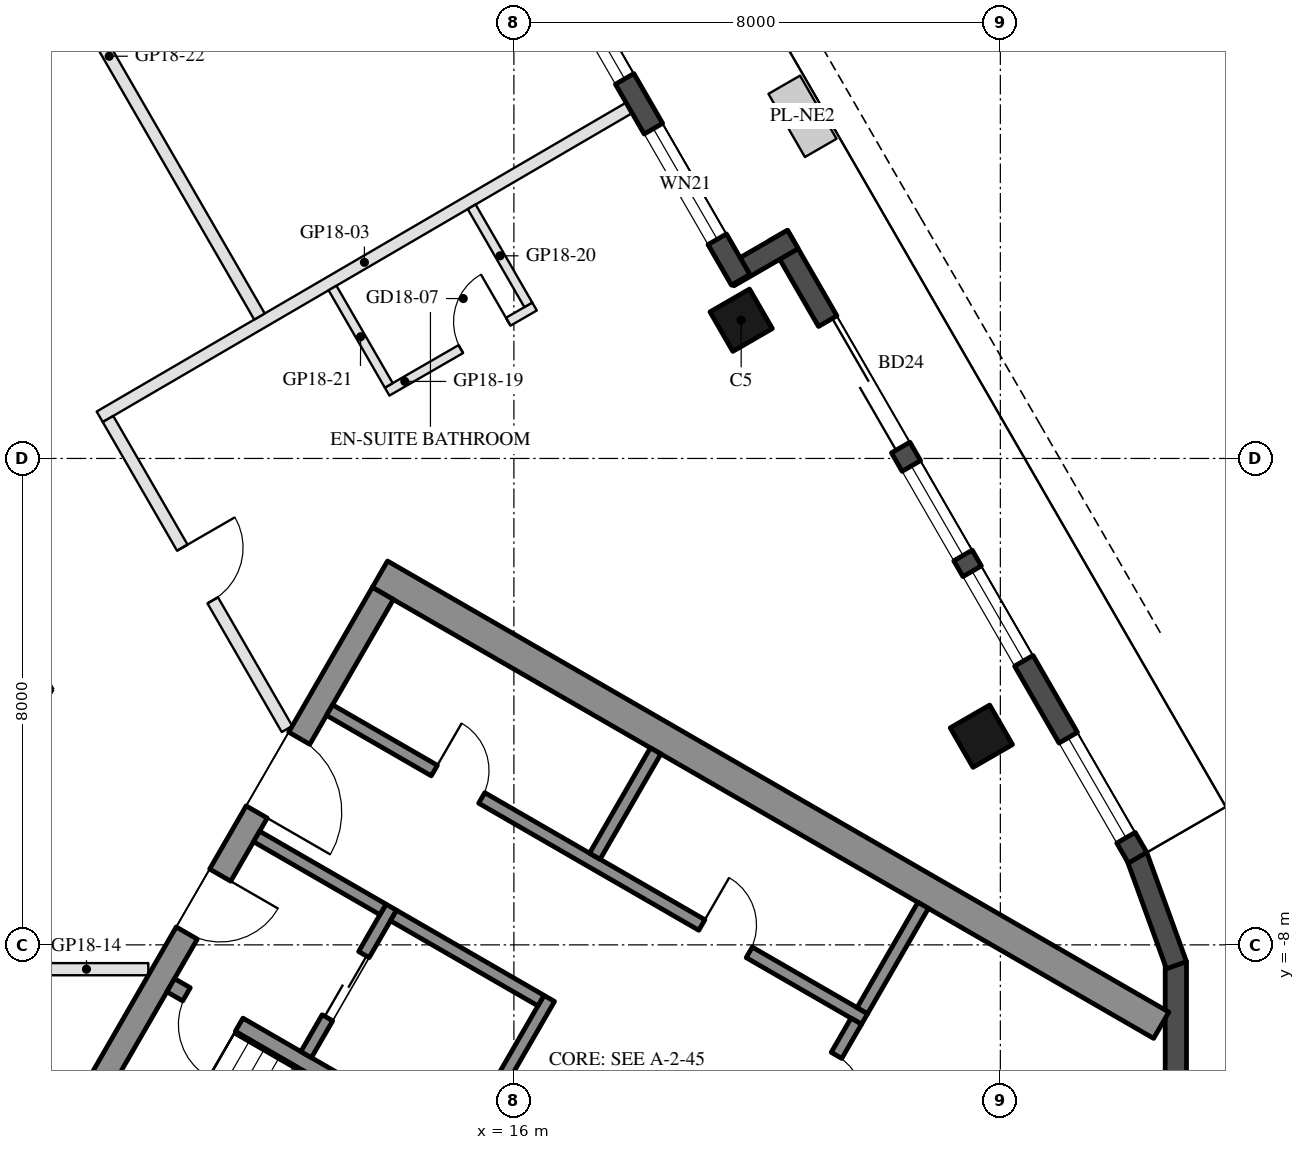
"""IFC4 building model, lengths in metres.
Left out: names, types, materials, properties, quantities, classifications, styles, units other than length and angle.
Written with IfcOpenShell. Run it as: python <this file> out.ifc"""

import sys

from ifc_helpers import new_model, si_unit, direction, frame, frame_2d, origin, origin_2d, place, context, subcontext, project, spatial, rectangle, hollow_rectangle, extrude, element, fill, save


model = new_model("IFC4")
c1 = context("Model", 3, precision=1e-05, world=origin(), true_north=direction((0.0, 1.0)))
c2 = subcontext(c1, "Body", "Model", "MODEL_VIEW")
j1 = project(units=[si_unit("LENGTHUNIT", "METRE"), si_unit("PLANEANGLEUNIT", "RADIAN")], contexts=[c1])
p1 = place(None, origin())
s1 = spatial("IfcSite", under=j1, at=p1, CompositionType="ELEMENT")
p2 = place(p1, origin())
s2 = spatial("IfcBuilding", under=s1, at=p2, CompositionType="ELEMENT")
p3 = place(p2, frame((0.0, 0.0, 194.7)))
s3 = spatial("IfcBuildingStorey", under=s2, at=p3, CompositionType="ELEMENT", Elevation=194.7)
for number, where, z_axis, x_axis in (
    (1, (23.688, -4.568, 0.0), (0.0, 0.0, 1.0), (-0.5, 0.866, 0.0)),
    (2, (19.738, 2.273, 0.0), (0.0, 0.0, 1.0), (-0.5, 0.866, 0.0)),
):
    element("IfcColumn", number, at=place(p3, frame(where, z_axis=z_axis, x_axis=x_axis)), inside=s3, PredefinedType="COLUMN", context=c2, shape_type="SweptSolid", body=[
        extrude(hollow_rectangle(XDim=0.75, YDim=0.75, WallThickness=0.035, at=origin_2d()), origin(), (0.0, 0.0, 1.0), 3.7),
    ])
for number, where, z_axis, x_axis in (
    (3, (26.244, -11.92, 0.0), (0.0, 0.0, 1.0), (0.342, 0.94, 0.0)),
    (4, (26.886, -10.185, 0.0), (0.0, 0.0, 1.0), (0.0, 1.0, 0.0)),
    (5, (26.897, -8.335, 0.0), (0.0, 0.0, 1.0), (-0.342, 0.94, 0.0)),
):
    element("IfcWall", number, at=place(p3, frame(where, z_axis=z_axis, x_axis=x_axis)), inside=s3, PredefinedType="SOLIDWALL", context=c2, shape_type="SweptSolid", body=[
        extrude(rectangle(XDim=1.91, YDim=0.35, at=frame_2d((0.955, 0.0))), origin(), (0.0, 0.0, 1.0), 3.55),
    ])
p4 = place(p3, frame((26.257, -6.567, 0.0), z_axis=(0.0, 0.0, 1.0), x_axis=(-0.500023526245, 0.866011820475, 0.0)))
e6 = element("IfcWall", 6, at=p4, inside=s3, PredefinedType="SOLIDWALL", context=c2, shape_type="SweptSolid", body=[
    extrude(rectangle(XDim=11.816, YDim=0.35, at=frame_2d((5.908, 0.0))), origin(), (0.0, 0.0, 1.0), 3.55),
])
p5 = place(p4, frame((0.38, 0.0, 0.3)))
e7 = element("IfcOpeningElement", 7, at=p5, cuts=e6, PredefinedType="OPENING", context=c2, shape_type="SweptSolid", body=[
    extrude(rectangle(XDim=1.9, YDim=2.65, at=frame_2d((0.95, 1.325))), frame((0.0, 0.185, 0.0), z_axis=(0.0, -1.0, 0.0), x_axis=(1.0, 0.0, 0.0)), (0.0, 0.0, 1.0), 0.37),
])
p6 = place(p4, frame((7.791, 0.0, 0.0)))
e8 = element("IfcOpeningElement", 8, at=p6, cuts=e6, PredefinedType="OPENING", context=c2, shape_type="SweptSolid", body=[
    extrude(rectangle(XDim=2.4, YDim=2.4, at=frame_2d((1.2, 1.2))), frame((0.0, 0.185, 0.0), z_axis=(0.0, -1.0, 0.0), x_axis=(1.0, 0.0, 0.0)), (0.0, 0.0, 1.0), 0.37),
])
p7 = place(p4, frame((3.741, 0.0, 0.3)))
e9 = element("IfcOpeningElement", 9, at=p7, cuts=e6, PredefinedType="OPENING", context=c2, shape_type="SweptSolid", body=[
    extrude(rectangle(XDim=1.7, YDim=2.65, at=frame_2d((0.85, 1.325))), frame((0.0, 0.185, 0.0), z_axis=(0.0, -1.0, 0.0), x_axis=(1.0, 0.0, 0.0)), (0.0, 0.0, 1.0), 0.37),
])
p8 = place(p4, frame((5.741, 0.0, 0.3)))
e10 = element("IfcOpeningElement", 10, at=p8, cuts=e6, PredefinedType="OPENING", context=c2, shape_type="SweptSolid", body=[
    extrude(rectangle(XDim=1.7, YDim=2.65, at=frame_2d((0.85, 1.325))), frame((0.0, 0.185, 0.0), z_axis=(0.0, -1.0, 0.0), x_axis=(1.0, 0.0, 0.0)), (0.0, 0.0, 1.0), 0.37),
])
p9 = place(p3, frame((20.588, 3.601, 0.0), z_axis=(0.0, 0.0, 1.0), x_axis=(-0.866005645448, -0.500034220881, 0.0)))
e11 = element("IfcWall", 11, at=p9, inside=s3, PredefinedType="SOLIDWALL", context=c2, shape_type="SweptSolid", body=[
    extrude(rectangle(XDim=1.22, YDim=0.35, at=frame_2d((0.61, 0.0))), origin(), (0.0, 0.0, 1.0), 3.55),
])
p10 = place(p3, frame((19.729, 2.938, 0.0), z_axis=(0.0, 0.0, 1.0), x_axis=(-0.499976430342, 0.866039011305, 0.0)))
e12 = element("IfcWall", 12, at=p10, inside=s3, PredefinedType="SOLIDWALL", context=c2, shape_type="SweptSolid", body=[
    extrude(rectangle(XDim=6.74, YDim=0.35, at=frame_2d((3.37, 0.0))), origin(), (0.0, 0.0, 1.0), 3.55),
])
p11 = place(p10, frame((0.77, 0.0, 0.3)))
e13 = element("IfcOpeningElement", 13, at=p11, cuts=e12, PredefinedType="OPENING", context=c2, shape_type="SweptSolid", body=[
    extrude(rectangle(XDim=2.1, YDim=2.65, at=frame_2d((1.05, 1.325))), frame((0.0, 0.185, 0.0), z_axis=(0.0, -1.0, 0.0), x_axis=(1.0, 0.0, 0.0)), (0.0, 0.0, 1.0), 0.37),
])
p12 = place(p10, frame((3.815, 0.0, 0.3)))
e14 = element("IfcOpeningElement", 14, at=p12, cuts=e12, PredefinedType="OPENING", context=c2, shape_type="SweptSolid", body=[
    extrude(rectangle(XDim=2.1, YDim=2.65, at=frame_2d((1.05, 1.325))), frame((0.0, 0.185, 0.0), z_axis=(0.0, -1.0, 0.0), x_axis=(1.0, 0.0, 0.0)), (0.0, 0.0, 1.0), 0.37),
])
p13 = place(p3, frame((13.797, -1.903, 0.0), z_axis=(0.0, 0.0, 1.0), x_axis=(0.866025009528, -0.500000682871, 0.0)))
e15 = element("IfcWall", 15, at=p13, inside=s3, PredefinedType="SHEAR", context=c2, shape_type="SweptSolid", body=[
    extrude(rectangle(XDim=14.837, YDim=0.5, at=frame_2d((7.418, 0.0))), origin(), (0.0, 0.0, 1.0), 3.5),
])
p14 = place(p3, frame((8.845, -10.88, 0.0), z_axis=(0.0, 0.0, 1.0), x_axis=(0.500004234368, 0.866022959057, 0.0)))
e16 = element("IfcWall", 16, at=p14, inside=s3, PredefinedType="SHEAR", context=c2, shape_type="SweptSolid", body=[
    extrude(rectangle(XDim=10.0, YDim=0.4, at=frame_2d((5.0, 0.0))), origin(), (0.0, 0.0, 1.0), 3.5),
])
p15 = place(p14, frame((3.55, 0.0, 0.0)))
e17 = element("IfcOpeningElement", 17, at=p15, cuts=e16, PredefinedType="OPENING", context=c2, shape_type="SweptSolid", body=[
    extrude(rectangle(XDim=1.1, YDim=2.1, at=frame_2d((0.55, 1.05))), frame((0.0, 0.21, 0.0), z_axis=(0.0, -1.0, 0.0), x_axis=(1.0, 0.0, 0.0)), (0.0, 0.0, 1.0), 0.42),
])
p16 = place(p14, frame((5.85, 0.0, 0.0)))
e18 = element("IfcOpeningElement", 18, at=p16, cuts=e16, PredefinedType="OPENING", context=c2, shape_type="SweptSolid", body=[
    extrude(rectangle(XDim=1.4, YDim=2.1, at=frame_2d((0.7, 1.05))), frame((0.0, 0.21, 0.0), z_axis=(0.0, -1.0, 0.0), x_axis=(1.0, 0.0, 0.0)), (0.0, 0.0, 1.0), 0.42),
])
p17 = place(p3, frame((10.356, -8.664, 0.0), z_axis=(0.0, 0.0, 1.0), x_axis=(0.866028629588, -0.499994412703, 0.0)))
e19 = element("IfcWall", 19, at=p17, inside=s3, PredefinedType="SHEAR", context=c2, shape_type="SweptSolid", body=[
    extrude(rectangle(XDim=6.45, YDim=0.25, at=frame_2d((3.225, 0.0))), origin(), (0.0, 0.0, 1.0), 3.5),
])
p18 = place(p17, frame((0.3, 0.0, 0.0)))
e20 = element("IfcOpeningElement", 20, at=p18, cuts=e19, PredefinedType="OPENING", context=c2, shape_type="SweptSolid", body=[
    extrude(rectangle(XDim=1.0, YDim=2.1, at=frame_2d((0.5, 1.05))), frame((0.0, 0.135, 0.0), z_axis=(0.0, -1.0, 0.0), x_axis=(1.0, 0.0, 0.0)), (0.0, 0.0, 1.0), 0.27),
])
p19 = place(p3, frame((15.181, -11.305, 0.0), z_axis=(0.0, 0.0, 1.0), x_axis=(0.49994636267, 0.866056369097, 0.0)))
e21 = element("IfcWall", 21, at=p19, inside=s3, PredefinedType="SHEAR", context=c2, shape_type="SweptSolid", body=[
    extrude(rectangle(XDim=2.8, YDim=0.2, at=frame_2d((1.4, 0.0))), origin(), (0.0, 0.0, 1.0), 3.5),
])
p20 = place(p3, frame((12.583, -9.805, 0.0), z_axis=(0.0, 0.0, 1.0), x_axis=(0.49994636267, 0.866056369097, 0.0)))
e22 = element("IfcWall", 22, at=p20, inside=s3, PredefinedType="SHEAR", context=c2, shape_type="SweptSolid", body=[
    extrude(rectangle(XDim=2.8, YDim=0.2, at=frame_2d((1.4, 0.0))), origin(), (0.0, 0.0, 1.0), 3.5),
])
p21 = place(p20, frame((0.7, 0.0, 0.0)))
e23 = element("IfcOpeningElement", 23, at=p21, cuts=e22, PredefinedType="OPENING", context=c2, shape_type="SweptSolid", body=[
    extrude(rectangle(XDim=1.2, YDim=2.1, at=frame_2d((0.6, 1.05))), frame((0.0, 0.11, 0.0), z_axis=(0.0, -1.0, 0.0), x_axis=(1.0, 0.0, 0.0)), (0.0, 0.0, 1.0), 0.22),
])
p22 = place(p3, frame((11.768, -6.217, 0.0), z_axis=(0.0, 0.0, 1.0), x_axis=(0.866050077142, -0.499957262057, 0.0)))
e24 = element("IfcWall", 24, at=p22, inside=s3, PredefinedType="SHEAR", context=c2, shape_type="SweptSolid", body=[
    extrude(rectangle(XDim=2.4, YDim=0.2, at=frame_2d((1.2, 0.0))), origin(), (0.0, 0.0, 1.0), 3.5),
])
p23 = place(p3, frame((14.02, -7.517, 0.0), z_axis=(0.0, 0.0, 1.0), x_axis=(0.866034573852, -0.49998411664, 0.0)))
e25 = element("IfcWall", 25, at=p23, inside=s3, PredefinedType="SHEAR", context=c2, shape_type="SweptSolid", body=[
    extrude(rectangle(XDim=2.8, YDim=0.2, at=frame_2d((1.4, 0.0))), origin(), (0.0, 0.0, 1.0), 3.5),
])
p24 = place(p3, frame((12.968, -4.138, 0.0), z_axis=(0.0, 0.0, 1.0), x_axis=(0.866028328073, -0.49999493495, 0.0)))
e26 = element("IfcWall", 26, at=p24, inside=s3, PredefinedType="SHEAR", context=c2, shape_type="SweptSolid", body=[
    extrude(rectangle(XDim=10.16, YDim=0.2, at=frame_2d((5.08, 0.0))), origin(), (0.0, 0.0, 1.0), 3.5),
])
p25 = place(p24, frame((1.99, 0.0, 0.0)))
e27 = element("IfcOpeningElement", 27, at=p25, cuts=e26, PredefinedType="OPENING", context=c2, shape_type="SweptSolid", body=[
    extrude(rectangle(XDim=0.9, YDim=2.1, at=frame_2d((0.45, 1.05))), frame((0.0, 0.11, 0.0), z_axis=(0.0, -1.0, 0.0), x_axis=(1.0, 0.0, 0.0)), (0.0, 0.0, 1.0), 0.22),
])
p26 = place(p24, frame((7.07, 0.0, 0.0)))
e28 = element("IfcOpeningElement", 28, at=p26, cuts=e26, PredefinedType="OPENING", context=c2, shape_type="SweptSolid", body=[
    extrude(rectangle(XDim=0.9, YDim=2.1, at=frame_2d((0.45, 1.05))), frame((0.0, 0.11, 0.0), z_axis=(0.0, -1.0, 0.0), x_axis=(1.0, 0.0, 0.0)), (0.0, 0.0, 1.0), 0.22),
])
p27 = place(p3, frame((20.43, -11.333, 0.0), z_axis=(0.0, 0.0, 1.0), x_axis=(0.500001309137, 0.866024647952, 0.0)))
e29 = element("IfcWall", 29, at=p27, inside=s3, PredefinedType="SHEAR", context=c2, shape_type="SweptSolid", body=[
    extrude(rectangle(XDim=2.4, YDim=0.2, at=frame_2d((1.2, 0.0))), origin(), (0.0, 0.0, 1.0), 3.5),
])
p28 = place(p27, frame((0.85, 0.0, 0.0)))
e30 = element("IfcOpeningElement", 30, at=p28, cuts=e29, PredefinedType="OPENING", context=c2, shape_type="SweptSolid", body=[
    extrude(rectangle(XDim=0.9, YDim=2.1, at=frame_2d((0.45, 1.05))), frame((0.0, 0.11, 0.0), z_axis=(0.0, -1.0, 0.0), x_axis=(1.0, 0.0, 0.0)), (0.0, 0.0, 1.0), 0.22),
])
for number, where, z_axis, x_axis in (
    (31, (17.331, -6.542, 0.0), (0.0, 0.0, 1.0), (0.5, 0.866, 0.0)),
    (32, (21.73, -9.082, 0.0), (0.0, 0.0, 1.0), (0.5, 0.866, 0.0)),
):
    element("IfcWall", number, at=place(p3, frame(where, z_axis=z_axis, x_axis=x_axis)), inside=s3, PredefinedType="SHEAR", context=c2, shape_type="SweptSolid", body=[
        extrude(rectangle(XDim=2.0, YDim=0.2, at=frame_2d((1.0, 0.0))), origin(), (0.0, 0.0, 1.0), 3.5),
    ])
p29 = place(p3, frame((17.895, 5.766, 0.0), z_axis=(0.0, 0.0, 1.0), x_axis=(-0.863697195261, -0.504011066246, 0.0)))
e33 = element("IfcWall", 33, at=p29, inside=s3, PredefinedType="PARTITIONING", context=c2, shape_type="SweptSolid", body=[
    extrude(rectangle(XDim=10.08, YDim=0.2, at=frame_2d((5.04, 0.0))), origin(), (0.0, 0.0, 1.0), 2.95),
])
p30 = place(p3, frame((9.988, -8.4, 0.0), z_axis=(0.0, 0.0, 1.0), x_axis=(-1.0, 0.0, 0.0)))
e34 = element("IfcWall", 34, at=p30, inside=s3, PredefinedType="PARTITIONING", context=c2, shape_type="SweptSolid", body=[
    extrude(rectangle(XDim=5.088, YDim=0.2, at=frame_2d((2.544, 0.0))), origin(), (0.0, 0.0, 1.0), 2.95),
])
p31 = place(p30, frame((2.044, 0.0, 0.0)))
e35 = element("IfcOpeningElement", 35, at=p31, cuts=e34, PredefinedType="OPENING", context=c2, shape_type="SweptSolid", body=[
    extrude(rectangle(XDim=1.0, YDim=2.1, at=frame_2d((0.5, 1.05))), frame((0.0, 0.11, 0.0), z_axis=(0.0, -1.0, 0.0), x_axis=(1.0, 0.0, 0.0)), (0.0, 0.0, 1.0), 0.22),
])
p32 = place(p3, frame((9.325, 0.649, 0.0), z_axis=(0.0, 0.0, 1.0), x_axis=(0.500032331163, -0.866006736574, 0.0)))
e36 = element("IfcWall", 36, at=p32, inside=s3, PredefinedType="PARTITIONING", context=c2, shape_type="SweptSolid", body=[
    extrude(rectangle(XDim=5.888, YDim=0.2, at=frame_2d((2.944, 0.0))), origin(), (0.0, 0.0, 1.0), 2.95),
])
p33 = place(p32, frame((2.444, 0.0, 0.0)))
e37 = element("IfcOpeningElement", 37, at=p33, cuts=e36, PredefinedType="OPENING", context=c2, shape_type="SweptSolid", body=[
    extrude(rectangle(XDim=1.0, YDim=2.1, at=frame_2d((0.5, 1.05))), frame((0.0, 0.11, 0.0), z_axis=(0.0, -1.0, 0.0), x_axis=(1.0, 0.0, 0.0)), (0.0, 0.0, 1.0), 0.22),
])
p34 = place(p3, frame((13.915, 1.099, 0.0), z_axis=(0.0, 0.0, 1.0), x_axis=(0.866018616679, 0.500011755427, 0.0)))
e38 = element("IfcWall", 38, at=p34, inside=s3, PredefinedType="PARTITIONING", context=c2, shape_type="SweptSolid", body=[
    extrude(rectangle(XDim=2.8, YDim=0.15, at=frame_2d((1.4, 0.0))), origin(), (0.0, 0.0, 1.0), 3.55),
])
p35 = place(p34, frame((1.4, 0.0, 0.0)))
e39 = element("IfcOpeningElement", 39, at=p35, cuts=e38, PredefinedType="OPENING", context=c2, shape_type="SweptSolid", body=[
    extrude(rectangle(XDim=0.9, YDim=2.1, at=frame_2d((0.45, 1.05))), frame((0.0, 0.085, 0.0), z_axis=(0.0, -1.0, 0.0), x_axis=(1.0, 0.0, 0.0)), (0.0, 0.0, 1.0), 0.17),
])
p36 = place(p3, frame((16.237, 2.526, 0.0), z_axis=(0.0, 0.0, 1.0), x_axis=(-0.500043919151, 0.866000045566, 0.0)))
e40 = element("IfcWall", 40, at=p36, inside=s3, PredefinedType="PARTITIONING", context=c2, shape_type="SweptSolid", body=[
    extrude(rectangle(XDim=1.863, YDim=0.15, at=frame_2d((0.931, 0.0))), origin(), (0.0, 0.0, 1.0), 3.55),
])
p37 = place(p3, frame((13.942, 1.201, 0.0), z_axis=(0.0, 0.0, 1.0), x_axis=(-0.500026996568, 0.866009816748, 0.0)))
e41 = element("IfcWall", 41, at=p37, inside=s3, PredefinedType="PARTITIONING", context=c2, shape_type="SweptSolid", body=[
    extrude(rectangle(XDim=1.851, YDim=0.15, at=frame_2d((0.925, 0.0))), origin(), (0.0, 0.0, 1.0), 3.55),
])
p38 = place(p3, frame((6.873, 10.896, 0.0), z_axis=(0.0, 0.0, 1.0), x_axis=(0.499987518031, -0.866032610133, 0.0)))
e42 = element("IfcWall", 42, at=p38, inside=s3, PredefinedType="PARTITIONING", context=c2, shape_type="SweptSolid", body=[
    extrude(rectangle(XDim=9.886, YDim=0.2, at=frame_2d((4.943, 0.0))), origin(), (0.0, 0.0, 1.0), 2.95),
])
p39 = place(p38, frame((2.45, 0.0, 0.0)))
e43 = element("IfcOpeningElement", 43, at=p39, cuts=e42, PredefinedType="OPENING", context=c2, shape_type="SweptSolid", body=[
    extrude(rectangle(XDim=1.0, YDim=2.1, at=frame_2d((0.5, 1.05))), frame((0.0, 0.11, 0.0), z_axis=(0.0, -1.0, 0.0), x_axis=(1.0, 0.0, 0.0)), (0.0, 0.0, 1.0), 0.22),
])
p40 = place(p5, origin())
e44 = element("IfcWindow", 44, at=p40, inside=s3, PartitioningType="SINGLE_PANEL", PredefinedType="WINDOW", context=c2, shape_type="SweptSolid", body=[
    extrude(rectangle(XDim=1.9, YDim=2.65, at=frame_2d((0.95, 1.325))), frame((0.0, 0.03, 0.0), z_axis=(0.0, -1.0, 0.0), x_axis=(1.0, 0.0, 0.0)), (0.0, 0.0, 1.0), 0.06),
])
fill(e7, e44)
p41 = place(p6, frame((2.4, 0.0, 0.0), z_axis=(0.0, 0.0, 1.0), x_axis=(-1.0, 0.0, 0.0)))
e45 = element("IfcDoor", 45, at=p41, inside=s3, OperationType="SLIDING_TO_LEFT", PredefinedType="DOOR", context=c2, shape_type="SweptSolid", body=[
    extrude(rectangle(XDim=2.4, YDim=2.4, at=frame_2d((1.2, 1.2))), frame((0.0, 0.025, 0.0), z_axis=(0.0, -1.0, 0.0), x_axis=(1.0, 0.0, 0.0)), (0.0, 0.0, 1.0), 0.05),
])
fill(e8, e45)
p42 = place(p7, origin())
e46 = element("IfcWindow", 46, at=p42, inside=s3, PartitioningType="SINGLE_PANEL", PredefinedType="WINDOW", context=c2, shape_type="SweptSolid", body=[
    extrude(rectangle(XDim=1.7, YDim=2.65, at=frame_2d((0.85, 1.325))), frame((0.0, 0.03, 0.0), z_axis=(0.0, -1.0, 0.0), x_axis=(1.0, 0.0, 0.0)), (0.0, 0.0, 1.0), 0.06),
])
fill(e9, e46)
p43 = place(p8, origin())
e47 = element("IfcWindow", 47, at=p43, inside=s3, PartitioningType="SINGLE_PANEL", PredefinedType="WINDOW", context=c2, shape_type="SweptSolid", body=[
    extrude(rectangle(XDim=1.7, YDim=2.65, at=frame_2d((0.85, 1.325))), frame((0.0, 0.03, 0.0), z_axis=(0.0, -1.0, 0.0), x_axis=(1.0, 0.0, 0.0)), (0.0, 0.0, 1.0), 0.06),
])
fill(e10, e47)
p44 = place(p11, origin())
e48 = element("IfcWindow", 48, at=p44, inside=s3, PartitioningType="SINGLE_PANEL", PredefinedType="WINDOW", context=c2, shape_type="SweptSolid", body=[
    extrude(rectangle(XDim=2.1, YDim=2.65, at=frame_2d((1.05, 1.325))), frame((0.0, 0.03, 0.0), z_axis=(0.0, -1.0, 0.0), x_axis=(1.0, 0.0, 0.0)), (0.0, 0.0, 1.0), 0.06),
])
fill(e13, e48)
p45 = place(p12, origin())
e49 = element("IfcWindow", 49, at=p45, inside=s3, PartitioningType="SINGLE_PANEL", PredefinedType="WINDOW", context=c2, shape_type="SweptSolid", body=[
    extrude(rectangle(XDim=2.1, YDim=2.65, at=frame_2d((1.05, 1.325))), frame((0.0, 0.03, 0.0), z_axis=(0.0, -1.0, 0.0), x_axis=(1.0, 0.0, 0.0)), (0.0, 0.0, 1.0), 0.06),
])
fill(e14, e49)
p46 = place(p21, origin())
e50 = element("IfcDoor", 50, at=p46, inside=s3, OperationType="DOUBLE_DOOR_SLIDING", PredefinedType="DOOR", context=c2, shape_type="SweptSolid", body=[
    extrude(rectangle(XDim=1.2, YDim=2.1, at=frame_2d((0.6, 1.05))), frame((0.0, 0.025, 0.0), z_axis=(0.0, -1.0, 0.0), x_axis=(1.0, 0.0, 0.0)), (0.0, 0.0, 1.0), 0.05),
])
fill(e23, e50)
p47 = place(p25, origin())
e51 = element("IfcDoor", 51, at=p47, inside=s3, OperationType="SINGLE_SWING_LEFT", PredefinedType="DOOR", context=c2, shape_type="SweptSolid", body=[
    extrude(rectangle(XDim=0.9, YDim=2.1, at=frame_2d((0.45, 1.05))), frame((0.0, 0.025, 0.0), z_axis=(0.0, -1.0, 0.0), x_axis=(1.0, 0.0, 0.0)), (0.0, 0.0, 1.0), 0.05),
])
fill(e27, e51)
p48 = place(p26, origin())
e52 = element("IfcDoor", 52, at=p48, inside=s3, OperationType="SINGLE_SWING_LEFT", PredefinedType="DOOR", context=c2, shape_type="SweptSolid", body=[
    extrude(rectangle(XDim=0.9, YDim=2.1, at=frame_2d((0.45, 1.05))), frame((0.0, 0.025, 0.0), z_axis=(0.0, -1.0, 0.0), x_axis=(1.0, 0.0, 0.0)), (0.0, 0.0, 1.0), 0.05),
])
fill(e28, e52)
p49 = place(p28, frame((0.9, 0.0, 0.0), z_axis=(0.0, 0.0, 1.0), x_axis=(-1.0, 0.0, 0.0)))
e53 = element("IfcDoor", 53, at=p49, inside=s3, OperationType="SINGLE_SWING_RIGHT", PredefinedType="DOOR", context=c2, shape_type="SweptSolid", body=[
    extrude(rectangle(XDim=0.9, YDim=2.1, at=frame_2d((0.45, 1.05))), frame((0.0, 0.025, 0.0), z_axis=(0.0, -1.0, 0.0), x_axis=(1.0, 0.0, 0.0)), (0.0, 0.0, 1.0), 0.05),
])
fill(e30, e53)
p50 = place(p15, frame((1.1, 0.0, 0.0), z_axis=(0.0, 0.0, 1.0), x_axis=(-1.0, 0.0, 0.0)))
e54 = element("IfcDoor", 54, at=p50, inside=s3, OperationType="SINGLE_SWING_LEFT", PredefinedType="DOOR", context=c2, shape_type="SweptSolid", body=[
    extrude(rectangle(XDim=1.1, YDim=2.1, at=frame_2d((0.55, 1.05))), frame((0.0, 0.025, 0.0), z_axis=(0.0, -1.0, 0.0), x_axis=(1.0, 0.0, 0.0)), (0.0, 0.0, 1.0), 0.05),
])
fill(e17, e54)
p51 = place(p16, frame((1.4, 0.0, 0.0), z_axis=(0.0, 0.0, 1.0), x_axis=(-1.0, 0.0, 0.0)))
e55 = element("IfcDoor", 55, at=p51, inside=s3, OperationType="DOUBLE_DOOR_SINGLE_SWING", PredefinedType="DOOR", context=c2, shape_type="SweptSolid", body=[
    extrude(rectangle(XDim=1.4, YDim=2.1, at=frame_2d((0.7, 1.05))), frame((0.0, 0.025, 0.0), z_axis=(0.0, -1.0, 0.0), x_axis=(1.0, 0.0, 0.0)), (0.0, 0.0, 1.0), 0.05),
])
fill(e18, e55)
p52 = place(p18, frame((1.0, 0.0, 0.0), z_axis=(0.0, 0.0, 1.0), x_axis=(-1.0, 0.0, 0.0)))
e56 = element("IfcDoor", 56, at=p52, inside=s3, OperationType="SINGLE_SWING_LEFT", PredefinedType="DOOR", context=c2, shape_type="SweptSolid", body=[
    extrude(rectangle(XDim=1.0, YDim=2.1, at=frame_2d((0.5, 1.05))), frame((0.0, 0.025, 0.0), z_axis=(0.0, -1.0, 0.0), x_axis=(1.0, 0.0, 0.0)), (0.0, 0.0, 1.0), 0.05),
])
fill(e20, e56)
p53 = place(p35, origin())
e57 = element("IfcDoor", 57, at=p53, inside=s3, OperationType="SINGLE_SWING_RIGHT", PredefinedType="DOOR", context=c2, shape_type="SweptSolid", body=[
    extrude(rectangle(XDim=0.9, YDim=2.1, at=frame_2d((0.45, 1.05))), frame((0.0, 0.025, 0.0), z_axis=(0.0, -1.0, 0.0), x_axis=(1.0, 0.0, 0.0)), (0.0, 0.0, 1.0), 0.05),
])
fill(e39, e57)
p54 = place(p33, origin())
e58 = element("IfcDoor", 58, at=p54, inside=s3, OperationType="SINGLE_SWING_LEFT", PredefinedType="DOOR", context=c2, shape_type="SweptSolid", body=[
    extrude(rectangle(XDim=1.0, YDim=2.1, at=frame_2d((0.5, 1.05))), frame((0.0, 0.025, 0.0), z_axis=(0.0, -1.0, 0.0), x_axis=(1.0, 0.0, 0.0)), (0.0, 0.0, 1.0), 0.05),
])
fill(e37, e58)
save(model, sys.argv[1])
